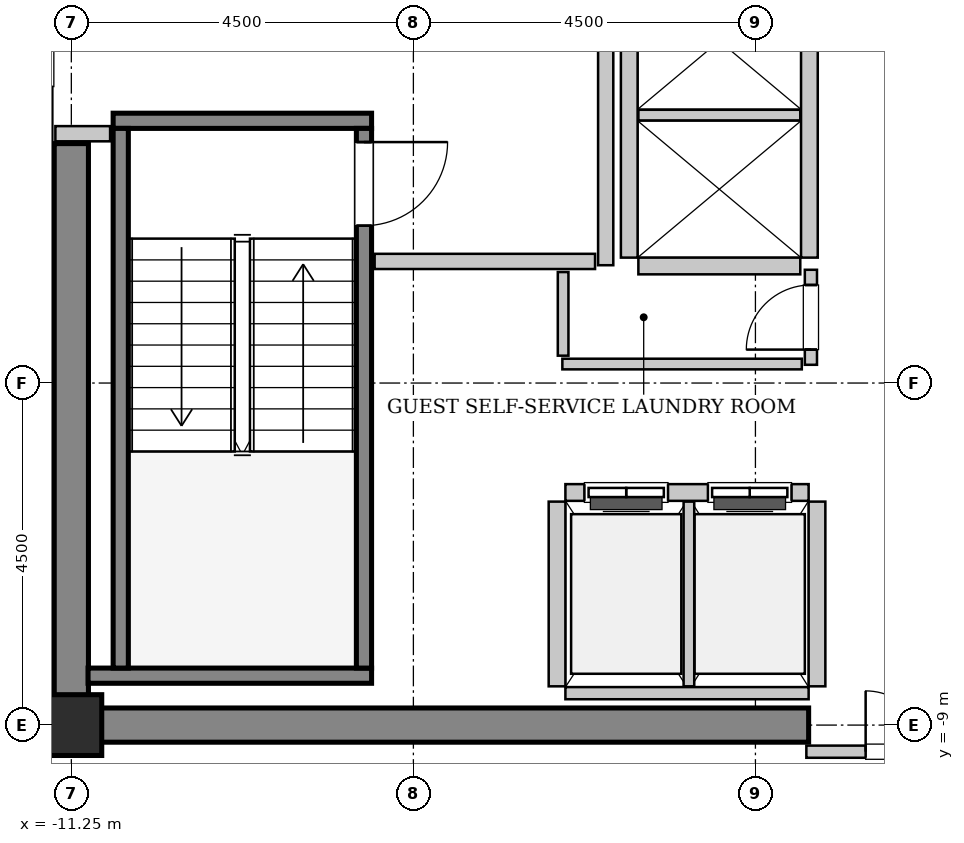
"""IFC4 building model, lengths in metres.
Left out: names, types, materials, properties, quantities, classifications, styles, units other than length and angle.
Written with IfcOpenShell. Run it as: python <this file> out.ifc"""

import sys

from ifc_helpers import new_model, si_unit, direction, frame, frame_2d, origin, origin_2d, place, context, subcontext, project, spatial, rectangle, hollow_rectangle, extrude, source, transform, mapped, element, fill, save


model = new_model("IFC4")
c1 = context("Model", 3, precision=1e-05, world=origin(), true_north=direction((0.0, 1.0)))
c2 = subcontext(c1, "Body", "Model", "MODEL_VIEW")
j1 = project(units=[si_unit("LENGTHUNIT", "METRE"), si_unit("PLANEANGLEUNIT", "RADIAN")], contexts=[c1])
p1 = place(None, origin())
s1 = spatial("IfcSite", under=j1, at=p1, CompositionType="ELEMENT")
p2 = place(p1, origin())
s2 = spatial("IfcBuilding", under=s1, at=p2, CompositionType="ELEMENT")
p3 = place(p2, frame((0.0, 0.0, 252.2)))
s3 = spatial("IfcBuildingStorey", under=s2, at=p3, CompositionType="ELEMENT", Elevation=252.2)
m1 = source(origin(), c2, "Body", "SweptSolid", [
    extrude(rectangle(XDim=9.925, YDim=0.45, at=frame_2d((4.962, 0.0))), origin(), (0.0, 0.0, 1.0), 3.8),
])
p4 = place(p3, frame((-11.475, -9.0, 0.0), z_axis=(0.0, 0.0, 1.0), x_axis=(1.0, 0.0, 0.0)))
e1 = element("IfcWall", 1, at=p4, inside=s3, PredefinedType="SHEAR", context=c2, shape_type="MappedRepresentation", body=[
    mapped(m1, transform((0.0, 0.0, 0.0), x_axis=(1.0, 0.0, 0.0), y_axis=(0.0, 1.0, 0.0), z_axis=(0.0, 0.0, 1.0), scale=1.0)),
])
m2 = source(origin(), c2, "Body", "SweptSolid", [
    extrude(rectangle(XDim=7.425, YDim=0.45, at=frame_2d((3.712, 0.0))), origin(), (0.0, 0.0, 1.0), 3.8),
])
p5 = place(p3, frame((-11.25, -8.775, 0.0), z_axis=(0.0, 0.0, 1.0), x_axis=(0.0, 1.0, 0.0)))
e2 = element("IfcWall", 2, at=p5, inside=s3, PredefinedType="SHEAR", context=c2, shape_type="MappedRepresentation", body=[
    mapped(m2, transform((0.0, 0.0, 0.0), x_axis=(1.0, 0.0, 0.0), y_axis=(0.0, 1.0, 0.0), z_axis=(0.0, 0.0, 1.0), scale=1.0)),
])
m3 = source(origin(), c2, "Body", "SweptSolid", [
    extrude(hollow_rectangle(XDim=0.8, YDim=0.8, WallThickness=0.04, InnerFilletRadius=0.04, OuterFilletRadius=0.08, at=origin_2d()), origin(), (0.0, 0.0, 1.0), 3.8),
])
p6 = place(p3, frame((-11.25, -9.0, 0.0), z_axis=(0.0, 0.0, 1.0), x_axis=(1.0, 0.0, 0.0)))
e3 = element("IfcColumn", 3, at=p6, inside=s3, PredefinedType="COLUMN", context=c2, shape_type="MappedRepresentation", body=[
    mapped(m3, transform((0.0, 0.0, 0.0), x_axis=(1.0, 0.0, 0.0), y_axis=(0.0, 1.0, 0.0), z_axis=(0.0, 0.0, 1.0), scale=1.0)),
])
m4 = source(origin(), c2, "Body", "SweptSolid", [
    extrude(rectangle(XDim=3.4, YDim=0.2, at=frame_2d((1.7, 0.0))), origin(), (0.0, 0.0, 1.0), 3.8),
])
p7 = place(p3, frame((-10.7, -1.05, 0.0), z_axis=(0.0, 0.0, 1.0), x_axis=(1.0, 0.0, 0.0)))
e4 = element("IfcWall", 4, at=p7, inside=s3, PredefinedType="SOLIDWALL", context=c2, shape_type="MappedRepresentation", body=[
    mapped(m4, transform((0.0, 0.0, 0.0), x_axis=(1.0, 0.0, 0.0), y_axis=(0.0, 1.0, 0.0), z_axis=(0.0, 0.0, 1.0), scale=1.0)),
])
m5 = source(origin(), c2, "Body", "SweptSolid", [
    extrude(rectangle(XDim=3.73, YDim=0.2, at=frame_2d((1.865, 0.0))), origin(), (0.0, 0.0, 1.0), 3.8),
])
p8 = place(p3, frame((-11.03, -8.35, 0.0), z_axis=(0.0, 0.0, 1.0), x_axis=(1.0, 0.0, 0.0)))
e5 = element("IfcWall", 5, at=p8, inside=s3, PredefinedType="SOLIDWALL", context=c2, shape_type="MappedRepresentation", body=[
    mapped(m5, transform((0.0, 0.0, 0.0), x_axis=(1.0, 0.0, 0.0), y_axis=(0.0, 1.0, 0.0), z_axis=(0.0, 0.0, 1.0), scale=1.0)),
])
m6 = source(origin(), c2, "Body", "SweptSolid", [
    extrude(rectangle(XDim=7.1, YDim=0.2, at=frame_2d((3.55, 0.0))), origin(), (0.0, 0.0, 1.0), 3.8),
])
p9 = place(p3, frame((-10.6, -1.15, 0.0), z_axis=(0.0, 0.0, 1.0), x_axis=(0.0, -1.0, 0.0)))
e6 = element("IfcWall", 6, at=p9, inside=s3, PredefinedType="SOLIDWALL", context=c2, shape_type="MappedRepresentation", body=[
    mapped(m6, transform((0.0, 0.0, 0.0), x_axis=(1.0, 0.0, 0.0), y_axis=(0.0, 1.0, 0.0), z_axis=(0.0, 0.0, 1.0), scale=1.0)),
])
p10 = place(p3, frame((-7.4, -1.15, 0.0), z_axis=(0.0, 0.0, 1.0), x_axis=(0.0, -1.0, 0.0)))
e7 = element("IfcWall", 7, at=p10, inside=s3, PredefinedType="SOLIDWALL", context=c2, shape_type="MappedRepresentation", body=[
    mapped(m6, transform((0.0, 0.0, 0.0), x_axis=(1.0, 0.0, 0.0), y_axis=(0.0, 1.0, 0.0), z_axis=(0.0, 0.0, 1.0), scale=1.0)),
])
p11 = place(p10, frame((0.18, 0.0, 0.0)))
e8 = element("IfcOpeningElement", 8, at=p11, cuts=e7, PredefinedType="OPENING", context=c2, shape_type="SweptSolid", body=[
    extrude(rectangle(XDim=1.1, YDim=2.15, at=frame_2d((0.55, 1.075))), frame((0.0, 0.11, 0.0), z_axis=(0.0, -1.0, 0.0), x_axis=(1.0, 0.0, 0.0)), (0.0, 0.0, 1.0), 0.22),
])
m7 = source(origin(), c2, "Body", "SweptSolid", [
    extrude(rectangle(XDim=3.2, YDim=0.22, at=frame_2d((1.6, 0.0))), origin(), (0.0, 0.0, 1.0), 3.535),
])
p12 = place(p3, frame((-1.55, -5.94, 0.0), z_axis=(0.0, 0.0, 1.0), x_axis=(-1.0, 0.0, 0.0)))
e9 = element("IfcWall", 9, at=p12, inside=s3, PredefinedType="SOLIDWALL", context=c2, shape_type="MappedRepresentation", body=[
    mapped(m7, transform((0.0, 0.0, 0.0), x_axis=(1.0, 0.0, 0.0), y_axis=(0.0, 1.0, 0.0), z_axis=(0.0, 0.0, 1.0), scale=1.0)),
])
p13 = place(p12, frame((1.85, 0.0, 0.0)))
e10 = element("IfcOpeningElement", 10, at=p13, cuts=e9, PredefinedType="OPENING", context=c2, shape_type="SweptSolid", body=[
    extrude(rectangle(XDim=1.1, YDim=2.2, at=frame_2d((0.55, 1.1))), frame((0.0, 0.12, 0.0), z_axis=(0.0, -1.0, 0.0), x_axis=(1.0, 0.0, 0.0)), (0.0, 0.0, 1.0), 0.24),
])
p14 = place(p12, frame((0.225, 0.0, 0.0)))
e11 = element("IfcOpeningElement", 11, at=p14, cuts=e9, PredefinedType="OPENING", context=c2, shape_type="SweptSolid", body=[
    extrude(rectangle(XDim=1.1, YDim=2.2, at=frame_2d((0.55, 1.1))), frame((0.0, 0.12, 0.0), z_axis=(0.0, -1.0, 0.0), x_axis=(1.0, 0.0, 0.0)), (0.0, 0.0, 1.0), 0.24),
])
m8 = source(origin(), c2, "Body", "SweptSolid", [
    extrude(rectangle(XDim=3.2, YDim=0.16, at=frame_2d((1.6, 0.0))), origin(), (0.0, 0.0, 1.0), 2.625),
])
p15 = place(p3, frame((-4.75, -8.58, 0.0), z_axis=(0.0, 0.0, 1.0), x_axis=(1.0, 0.0, 0.0)))
e12 = element("IfcWall", 12, at=p15, inside=s3, PredefinedType="PARTITIONING", context=c2, shape_type="MappedRepresentation", body=[
    mapped(m8, transform((0.0, 0.0, 0.0), x_axis=(1.0, 0.0, 0.0), y_axis=(0.0, 1.0, 0.0), z_axis=(0.0, 0.0, 1.0), scale=1.0)),
])
m9 = source(origin(), c2, "Body", "SweptSolid", [
    extrude(rectangle(XDim=2.43, YDim=0.22, at=frame_2d((1.215, 0.0))), origin(), (0.0, 0.0, 1.0), 3.535),
])
p16 = place(p3, frame((-4.86, -6.06, 0.0), z_axis=(0.0, 0.0, 1.0), x_axis=(0.0, -1.0, 0.0)))
e13 = element("IfcWall", 13, at=p16, inside=s3, PredefinedType="SOLIDWALL", context=c2, shape_type="MappedRepresentation", body=[
    mapped(m9, transform((0.0, 0.0, 0.0), x_axis=(1.0, 0.0, 0.0), y_axis=(0.0, 1.0, 0.0), z_axis=(0.0, 0.0, 1.0), scale=1.0)),
])
m10 = source(origin(), c2, "Body", "SweptSolid", [
    extrude(rectangle(XDim=2.43, YDim=0.14, at=frame_2d((1.215, 0.0))), origin(), (0.0, 0.0, 1.0), 3.535),
])
p17 = place(p3, frame((-3.125, -8.49, 0.0), z_axis=(0.0, 0.0, 1.0), x_axis=(0.0, 1.0, 0.0)))
e14 = element("IfcWall", 14, at=p17, inside=s3, PredefinedType="PARTITIONING", context=c2, shape_type="MappedRepresentation", body=[
    mapped(m10, transform((0.0, 0.0, 0.0), x_axis=(1.0, 0.0, 0.0), y_axis=(0.0, 1.0, 0.0), z_axis=(0.0, 0.0, 1.0), scale=1.0)),
])
p18 = place(p3, frame((-1.44, -8.49, 0.0), z_axis=(0.0, 0.0, 1.0), x_axis=(0.0, 1.0, 0.0)))
e15 = element("IfcWall", 15, at=p18, inside=s3, PredefinedType="SOLIDWALL", context=c2, shape_type="MappedRepresentation", body=[
    mapped(m9, transform((0.0, 0.0, 0.0), x_axis=(1.0, 0.0, 0.0), y_axis=(0.0, 1.0, 0.0), z_axis=(0.0, 0.0, 1.0), scale=1.0)),
])
m11 = source(origin(), c2, "Body", "SweptSolid", [
    extrude(rectangle(XDim=5.7, YDim=0.22, at=frame_2d((2.85, 0.0))), origin(), (0.0, 0.0, 1.0), 3.535),
])
for number, where, z_axis, x_axis in (
    (16, (-1.54, -2.85, 0.0), (0.0, 0.0, 1.0), (0.0, 1.0, 0.0)),
    (17, (-3.91, 2.85, 0.0), (0.0, 0.0, 1.0), (0.0, -1.0, 0.0)),
):
    element("IfcWall", number, at=place(p3, frame(where, z_axis=z_axis, x_axis=x_axis)), inside=s3, PredefinedType="SOLIDWALL", context=c2, shape_type="MappedRepresentation", body=[
        mapped(m11, transform((0.0, 0.0, 0.0), x_axis=(1.0, 0.0, 0.0), y_axis=(0.0, 1.0, 0.0), z_axis=(0.0, 0.0, 1.0), scale=1.0)),
    ])
m12 = source(origin(), c2, "Body", "SweptSolid", [
    extrude(rectangle(XDim=2.13, YDim=0.22, at=frame_2d((1.065, 0.0))), origin(), (0.0, 0.0, 1.0), 3.535),
])
p19 = place(p3, frame((-3.79, -2.96, 0.0), z_axis=(0.0, 0.0, 1.0), x_axis=(1.0, 0.0, 0.0)))
e18 = element("IfcWall", 18, at=p19, inside=s3, PredefinedType="SOLIDWALL", context=c2, shape_type="MappedRepresentation", body=[
    mapped(m12, transform((0.0, 0.0, 0.0), x_axis=(1.0, 0.0, 0.0), y_axis=(0.0, 1.0, 0.0), z_axis=(0.0, 0.0, 1.0), scale=1.0)),
])
m13 = source(origin(), c2, "Body", "SweptSolid", [
    extrude(rectangle(XDim=2.13, YDim=0.14, at=frame_2d((1.065, 0.0))), origin(), (0.0, 0.0, 1.0), 3.535),
])
p20 = place(p3, frame((-3.79, -0.975, 0.0), z_axis=(0.0, 0.0, 1.0), x_axis=(1.0, 0.0, 0.0)))
e19 = element("IfcWall", 19, at=p20, inside=s3, PredefinedType="PARTITIONING", context=c2, shape_type="MappedRepresentation", body=[
    mapped(m13, transform((0.0, 0.0, 0.0), x_axis=(1.0, 0.0, 0.0), y_axis=(0.0, 1.0, 0.0), z_axis=(0.0, 0.0, 1.0), scale=1.0)),
])
m14 = source(origin(), c2, "Body", "SweptSolid", [
    extrude(rectangle(XDim=5.9, YDim=0.2, at=frame_2d((2.95, 0.0))), origin(), (0.0, 0.0, 1.0), 3.535),
])
p21 = place(p3, frame((-4.22, -2.95, 0.0), z_axis=(0.0, 0.0, 1.0), x_axis=(0.0, 1.0, 0.0)))
e20 = element("IfcWall", 20, at=p21, inside=s3, PredefinedType="PARTITIONING", context=c2, shape_type="MappedRepresentation", body=[
    mapped(m14, transform((0.0, 0.0, 0.0), x_axis=(1.0, 0.0, 0.0), y_axis=(0.0, 1.0, 0.0), z_axis=(0.0, 0.0, 1.0), scale=1.0)),
])
m15 = source(origin(), c2, "Body", "SweptSolid", [
    extrude(rectangle(XDim=2.9, YDim=0.2, at=frame_2d((1.45, 0.0))), origin(), (0.0, 0.0, 1.0), 3.535),
])
p22 = place(p3, frame((-7.26, -2.9, 0.0), z_axis=(0.0, 0.0, 1.0), x_axis=(1.0, 0.0, 0.0)))
e21 = element("IfcWall", 21, at=p22, inside=s3, PredefinedType="PARTITIONING", context=c2, shape_type="MappedRepresentation", body=[
    mapped(m15, transform((0.0, 0.0, 0.0), x_axis=(1.0, 0.0, 0.0), y_axis=(0.0, 1.0, 0.0), z_axis=(0.0, 0.0, 1.0), scale=1.0)),
])
m16 = source(origin(), c2, "Body", "SweptSolid", [
    extrude(rectangle(XDim=0.72, YDim=0.2, at=frame_2d((0.36, 0.0))), origin(), (0.0, 0.0, 1.0), 3.535),
])
p23 = place(p3, frame((-11.46, -1.22, 0.0), z_axis=(0.0, 0.0, 1.0), x_axis=(1.0, 0.0, 0.0)))
e22 = element("IfcWall", 22, at=p23, inside=s3, PredefinedType="PARTITIONING", context=c2, shape_type="MappedRepresentation", body=[
    mapped(m16, transform((0.0, 0.0, 0.0), x_axis=(1.0, 0.0, 0.0), y_axis=(0.0, 1.0, 0.0), z_axis=(0.0, 0.0, 1.0), scale=1.0)),
])
m17 = source(origin(), c2, "Body", "SweptSolid", [
    extrude(rectangle(XDim=3.16, YDim=0.16, at=frame_2d((1.58, 0.0))), origin(), (0.0, 0.0, 1.0), 2.625),
])
p24 = place(p3, frame((-1.58, -9.35, 0.0), z_axis=(0.0, 0.0, 1.0), x_axis=(1.0, 0.0, 0.0)))
e23 = element("IfcWall", 23, at=p24, inside=s3, PredefinedType="PARTITIONING", context=c2, shape_type="MappedRepresentation", body=[
    mapped(m17, transform((0.0, 0.0, 0.0), x_axis=(1.0, 0.0, 0.0), y_axis=(0.0, 1.0, 0.0), z_axis=(0.0, 0.0, 1.0), scale=1.0)),
])
p25 = place(p24, frame((0.78, 0.0, 0.0)))
e24 = element("IfcOpeningElement", 24, at=p25, cuts=e23, PredefinedType="OPENING", context=c2, shape_type="SweptSolid", body=[
    extrude(rectangle(XDim=1.6, YDim=2.3, at=frame_2d((0.8, 1.15))), frame((0.0, 0.09, 0.0), z_axis=(0.0, -1.0, 0.0), x_axis=(1.0, 0.0, 0.0)), (0.0, 0.0, 1.0), 0.18),
])
m18 = source(origin(), c2, "Body", "SweptSolid", [
    extrude(rectangle(XDim=1.25, YDim=0.16, at=frame_2d((0.625, 0.0))), origin(), (0.0, 0.0, 1.0), 3.535),
])
p26 = place(p3, frame((-1.52, -4.26, 0.0), z_axis=(0.0, 0.0, 1.0), x_axis=(0.0, 1.0, 0.0)))
e25 = element("IfcWall", 25, at=p26, inside=s3, PredefinedType="PARTITIONING", context=c2, shape_type="MappedRepresentation", body=[
    mapped(m18, transform((0.0, 0.0, 0.0), x_axis=(1.0, 0.0, 0.0), y_axis=(0.0, 1.0, 0.0), z_axis=(0.0, 0.0, 1.0), scale=1.0)),
])
p27 = place(p26, frame((0.2, 0.0, 0.0)))
e26 = element("IfcOpeningElement", 26, at=p27, cuts=e25, PredefinedType="OPENING", context=c2, shape_type="SweptSolid", body=[
    extrude(rectangle(XDim=0.85, YDim=2.1, at=frame_2d((0.425, 1.05))), frame((0.0, 0.09, 0.0), z_axis=(0.0, -1.0, 0.0), x_axis=(1.0, 0.0, 0.0)), (0.0, 0.0, 1.0), 0.18),
])
m19 = source(origin(), c2, "Body", "SweptSolid", [
    extrude(rectangle(XDim=3.15, YDim=0.14, at=frame_2d((1.575, 0.0))), origin(), (0.0, 0.0, 1.0), 3.535),
])
p28 = place(p3, frame((-4.79, -4.25, 0.0), z_axis=(0.0, 0.0, 1.0), x_axis=(1.0, 0.0, 0.0)))
e27 = element("IfcWall", 27, at=p28, inside=s3, PredefinedType="PARTITIONING", context=c2, shape_type="MappedRepresentation", body=[
    mapped(m19, transform((0.0, 0.0, 0.0), x_axis=(1.0, 0.0, 0.0), y_axis=(0.0, 1.0, 0.0), z_axis=(0.0, 0.0, 1.0), scale=1.0)),
])
m20 = source(origin(), c2, "Body", "SweptSolid", [
    extrude(rectangle(XDim=1.1, YDim=0.14, at=frame_2d((0.55, 0.0))), origin(), (0.0, 0.0, 1.0), 3.535),
])
p29 = place(p3, frame((-4.78, -4.14, 0.0), z_axis=(0.0, 0.0, 1.0), x_axis=(0.0, 1.0, 0.0)))
e28 = element("IfcWall", 28, at=p29, inside=s3, PredefinedType="PARTITIONING", context=c2, shape_type="MappedRepresentation", body=[
    mapped(m20, transform((0.0, 0.0, 0.0), x_axis=(1.0, 0.0, 0.0), y_axis=(0.0, 1.0, 0.0), z_axis=(0.0, 0.0, 1.0), scale=1.0)),
])
m21 = source(origin(), c2, "Body", "SweptSolid", [
    extrude(rectangle(XDim=1.1, YDim=2.15, at=frame_2d((0.55, 1.075))), frame((0.0, 0.025, 0.0), z_axis=(0.0, -1.0, 0.0), x_axis=(1.0, 0.0, 0.0)), (0.0, 0.0, 1.0), 0.05),
])
p30 = place(p11, origin())
e29 = element("IfcDoor", 29, at=p30, inside=s3, OperationType="SINGLE_SWING_LEFT", PredefinedType="DOOR", context=c2, shape_type="MappedRepresentation", body=[
    mapped(m21, transform((0.0, 0.0, 0.0), x_axis=(1.0, 0.0, 0.0), y_axis=(0.0, 1.0, 0.0), z_axis=(0.0, 0.0, 1.0), scale=1.0)),
])
fill(e8, e29)
m22 = source(origin(), c2, "Body", "SweptSolid", [
    extrude(rectangle(XDim=1.1, YDim=2.2, at=frame_2d((0.55, 1.1))), frame((0.0, 0.025, 0.0), z_axis=(0.0, -1.0, 0.0), x_axis=(1.0, 0.0, 0.0)), (0.0, 0.0, 1.0), 0.05),
])
p31 = place(p13, origin())
e30 = element("IfcDoor", 30, at=p31, inside=s3, OperationType="DOUBLE_DOOR_SLIDING", PredefinedType="DOOR", context=c2, shape_type="MappedRepresentation", body=[
    mapped(m22, transform((0.0, 0.0, 0.0), x_axis=(1.0, 0.0, 0.0), y_axis=(0.0, 1.0, 0.0), z_axis=(0.0, 0.0, 1.0), scale=1.0)),
])
fill(e10, e30)
p32 = place(p14, origin())
e31 = element("IfcDoor", 31, at=p32, inside=s3, OperationType="DOUBLE_DOOR_SLIDING", PredefinedType="DOOR", context=c2, shape_type="MappedRepresentation", body=[
    mapped(m22, transform((0.0, 0.0, 0.0), x_axis=(1.0, 0.0, 0.0), y_axis=(0.0, 1.0, 0.0), z_axis=(0.0, 0.0, 1.0), scale=1.0)),
])
fill(e11, e31)
m23 = source(origin(), c2, "Body", "SweptSolid", [
    extrude(rectangle(XDim=1.6, YDim=2.3, at=frame_2d((0.8, 1.15))), frame((0.0, 0.025, 0.0), z_axis=(0.0, -1.0, 0.0), x_axis=(1.0, 0.0, 0.0)), (0.0, 0.0, 1.0), 0.05),
])
p33 = place(p25, origin())
e32 = element("IfcDoor", 32, at=p33, inside=s3, OperationType="DOUBLE_DOOR_SINGLE_SWING", PredefinedType="DOOR", context=c2, shape_type="MappedRepresentation", body=[
    mapped(m23, transform((0.0, 0.0, 0.0), x_axis=(1.0, 0.0, 0.0), y_axis=(0.0, 1.0, 0.0), z_axis=(0.0, 0.0, 1.0), scale=1.0)),
])
fill(e24, e32)
m24 = source(origin(), c2, "Body", "SweptSolid", [
    extrude(rectangle(XDim=0.85, YDim=2.1, at=frame_2d((0.425, 1.05))), frame((0.0, 0.025, 0.0), z_axis=(0.0, -1.0, 0.0), x_axis=(1.0, 0.0, 0.0)), (0.0, 0.0, 1.0), 0.05),
])
p34 = place(p27, origin())
e33 = element("IfcDoor", 33, at=p34, inside=s3, OperationType="SINGLE_SWING_LEFT", PredefinedType="DOOR", context=c2, shape_type="MappedRepresentation", body=[
    mapped(m24, transform((0.0, 0.0, 0.0), x_axis=(1.0, 0.0, 0.0), y_axis=(0.0, 1.0, 0.0), z_axis=(0.0, 0.0, 1.0), scale=1.0)),
])
fill(e26, e33)
save(model, sys.argv[1])
